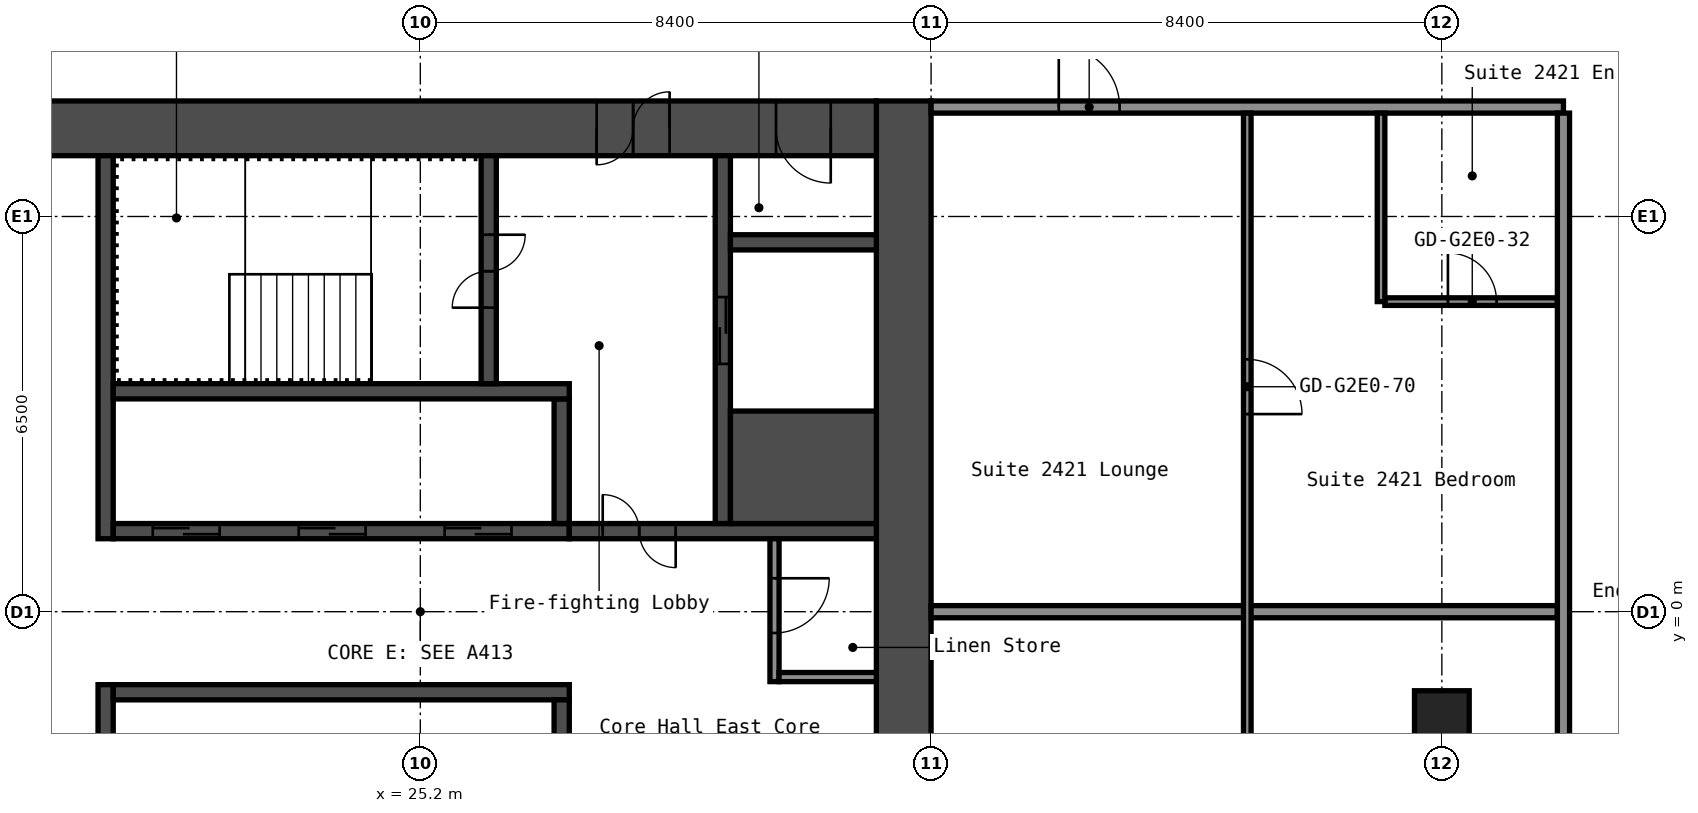
"""IFC4 building model, lengths in metres.
Left out: names, types, materials, properties, quantities, classifications, styles, units other than length and angle.
Written with IfcOpenShell. Run it as: python <this file> out.ifc"""

import sys

from ifc_helpers import new_model, si_unit, direction, frame, frame_2d, origin, origin_2d, place, context, subcontext, project, spatial, rectangle, hollow_rectangle, extrude, element, fill, save


model = new_model("IFC4")
c1 = context("Model", 3, precision=1e-05, world=origin(), true_north=direction((0.0, 1.0)))
c2 = subcontext(c1, "Body", "Model", "MODEL_VIEW")
j1 = project(units=[si_unit("LENGTHUNIT", "METRE"), si_unit("PLANEANGLEUNIT", "RADIAN")], contexts=[c1])
p1 = place(None, origin())
s1 = spatial("IfcSite", under=j1, at=p1, CompositionType="ELEMENT")
p2 = place(p1, origin())
s2 = spatial("IfcBuilding", under=s1, at=p2, CompositionType="ELEMENT")
p3 = place(p2, frame((0.0, 0.0, 88.2)))
s3 = spatial("IfcBuildingStorey", under=s2, at=p3, CompositionType="ELEMENT", Elevation=88.2)
p4 = place(p3, frame((42.0, -1.75, 0.0), z_axis=(0.0, 0.0, 1.0), x_axis=(1.0, 0.0, 0.0)))
e1 = element("IfcColumn", 1, at=p4, inside=s3, PredefinedType="COLUMN", context=c2, shape_type="SweptSolid", body=[
    extrude(hollow_rectangle(XDim=0.9, YDim=0.9, WallThickness=0.036, at=origin_2d()), origin(), (0.0, 0.0, 1.0), 2.8),
])
p5 = place(p3, frame((33.15, -8.4, 0.0), z_axis=(0.0, 0.0, 1.0), x_axis=(0.0, 1.0, 0.0)))
e2 = element("IfcWall", 2, at=p5, inside=s3, PredefinedType="SHEAR", context=c2, shape_type="SweptSolid", body=[
    extrude(rectangle(XDim=16.8, YDim=0.9, at=frame_2d((8.4, 0.0))), origin(), (0.0, 0.0, 1.0), 2.8),
])
p6 = place(p3, frame((17.7, 7.95, 0.0), z_axis=(0.0, 0.0, 1.0), x_axis=(1.0, 0.0, 0.0)))
e3 = element("IfcWall", 3, at=p6, inside=s3, PredefinedType="SHEAR", context=c2, shape_type="SweptSolid", body=[
    extrude(rectangle(XDim=15.0, YDim=0.9, at=frame_2d((7.5, 0.0))), origin(), (0.0, 0.0, 1.0), 2.8),
])
p7 = place(p6, frame((10.4, 0.0, 0.0)))
e4 = element("IfcOpeningElement", 4, at=p7, cuts=e3, PredefinedType="OPENING", context=c2, shape_type="SweptSolid", body=[
    extrude(rectangle(XDim=1.2, YDim=2.1, at=frame_2d((0.6, 1.05))), frame((0.0, 0.46, 0.0), z_axis=(0.0, -1.0, 0.0), x_axis=(1.0, 0.0, 0.0)), (0.0, 0.0, 1.0), 0.92),
])
p8 = place(p6, frame((13.35, 0.0, 0.0)))
e5 = element("IfcOpeningElement", 5, at=p8, cuts=e3, PredefinedType="OPENING", context=c2, shape_type="SweptSolid", body=[
    extrude(rectangle(XDim=0.9, YDim=2.1, at=frame_2d((0.45, 1.05))), frame((0.0, 0.46, 0.0), z_axis=(0.0, -1.0, 0.0), x_axis=(1.0, 0.0, 0.0)), (0.0, 0.0, 1.0), 0.92),
])
p9 = place(p3, frame((20.025, 1.2, 0.0), z_axis=(0.0, 0.0, 1.0), x_axis=(0.0, 1.0, 0.0)))
e6 = element("IfcWall", 6, at=p9, inside=s3, PredefinedType="SHEAR", context=c2, shape_type="SweptSolid", body=[
    extrude(rectangle(XDim=6.3, YDim=0.25, at=frame_2d((3.15, 0.0))), origin(), (0.0, 0.0, 1.0), 2.8),
])
p10 = place(p3, frame((20.025, -7.5, 0.0), z_axis=(0.0, 0.0, 1.0), x_axis=(0.0, 1.0, 0.0)))
e7 = element("IfcWall", 7, at=p10, inside=s3, PredefinedType="SHEAR", context=c2, shape_type="SweptSolid", body=[
    extrude(rectangle(XDim=6.3, YDim=0.25, at=frame_2d((3.15, 0.0))), origin(), (0.0, 0.0, 1.0), 2.8),
])
p11 = place(p10, frame((2.4, 0.0, 0.0)))
e8 = element("IfcOpeningElement", 8, at=p11, cuts=e7, PredefinedType="OPENING", context=c2, shape_type="SweptSolid", body=[
    extrude(rectangle(XDim=1.0, YDim=2.1, at=frame_2d((0.5, 1.05))), frame((0.0, 0.135, 0.0), z_axis=(0.0, -1.0, 0.0), x_axis=(1.0, 0.0, 0.0)), (0.0, 0.0, 1.0), 0.27),
])
p12 = place(p3, frame((20.15, 1.325, 0.0), z_axis=(0.0, 0.0, 1.0), x_axis=(1.0, 0.0, 0.0)))
e9 = element("IfcWall", 9, at=p12, inside=s3, PredefinedType="SHEAR", context=c2, shape_type="SweptSolid", body=[
    extrude(rectangle(XDim=7.5, YDim=0.25, at=frame_2d((3.75, 0.0))), origin(), (0.0, 0.0, 1.0), 2.8),
])
p13 = place(p12, frame((0.65, 0.0, 0.0)))
e10 = element("IfcOpeningElement", 10, at=p13, cuts=e9, PredefinedType="OPENING", context=c2, shape_type="SweptSolid", body=[
    extrude(rectangle(XDim=1.1, YDim=2.1, at=frame_2d((0.55, 1.05))), frame((0.0, 0.135, 0.0), z_axis=(0.0, -1.0, 0.0), x_axis=(1.0, 0.0, 0.0)), (0.0, 0.0, 1.0), 0.27),
])
p14 = place(p12, frame((3.05, 0.0, 0.0)))
e11 = element("IfcOpeningElement", 11, at=p14, cuts=e9, PredefinedType="OPENING", context=c2, shape_type="SweptSolid", body=[
    extrude(rectangle(XDim=1.1, YDim=2.1, at=frame_2d((0.55, 1.05))), frame((0.0, 0.135, 0.0), z_axis=(0.0, -1.0, 0.0), x_axis=(1.0, 0.0, 0.0)), (0.0, 0.0, 1.0), 0.27),
])
p15 = place(p12, frame((5.45, 0.0, 0.0)))
e12 = element("IfcOpeningElement", 12, at=p15, cuts=e9, PredefinedType="OPENING", context=c2, shape_type="SweptSolid", body=[
    extrude(rectangle(XDim=1.1, YDim=2.1, at=frame_2d((0.55, 1.05))), frame((0.0, 0.135, 0.0), z_axis=(0.0, -1.0, 0.0), x_axis=(1.0, 0.0, 0.0)), (0.0, 0.0, 1.0), 0.27),
])
p16 = place(p3, frame((27.525, 1.45, 0.0), z_axis=(0.0, 0.0, 1.0), x_axis=(0.0, 1.0, 0.0)))
e13 = element("IfcWall", 13, at=p16, inside=s3, PredefinedType="SHEAR", context=c2, shape_type="SweptSolid", body=[
    extrude(rectangle(XDim=2.05, YDim=0.25, at=frame_2d((1.025, 0.0))), origin(), (0.0, 0.0, 1.0), 2.8),
])
p17 = place(p3, frame((20.15, 3.625, 0.0), z_axis=(0.0, 0.0, 1.0), x_axis=(1.0, 0.0, 0.0)))
e14 = element("IfcWall", 14, at=p17, inside=s3, PredefinedType="SHEAR", context=c2, shape_type="SweptSolid", body=[
    extrude(rectangle(XDim=7.5, YDim=0.25, at=frame_2d((3.75, 0.0))), origin(), (0.0, 0.0, 1.0), 2.8),
])
p18 = place(p3, frame((26.325, 3.75, 0.0), z_axis=(0.0, 0.0, 1.0), x_axis=(0.0, 1.0, 0.0)))
e15 = element("IfcWall", 15, at=p18, inside=s3, PredefinedType="SHEAR", context=c2, shape_type="SweptSolid", body=[
    extrude(rectangle(XDim=3.75, YDim=0.25, at=frame_2d((1.875, 0.0))), origin(), (0.0, 0.0, 1.0), 2.8),
])
p19 = place(p18, frame((1.25, 0.0, 0.0)))
e16 = element("IfcOpeningElement", 16, at=p19, cuts=e15, PredefinedType="OPENING", context=c2, shape_type="SweptSolid", body=[
    extrude(rectangle(XDim=1.2, YDim=2.1, at=frame_2d((0.6, 1.05))), frame((0.0, 0.135, 0.0), z_axis=(0.0, -1.0, 0.0), x_axis=(1.0, 0.0, 0.0)), (0.0, 0.0, 1.0), 0.27),
])
p20 = place(p3, frame((27.65, 1.325, 0.0), z_axis=(0.0, 0.0, 1.0), x_axis=(1.0, 0.0, 0.0)))
e17 = element("IfcWall", 17, at=p20, inside=s3, PredefinedType="SHEAR", context=c2, shape_type="SweptSolid", body=[
    extrude(rectangle(XDim=5.05, YDim=0.25, at=frame_2d((2.525, 0.0))), origin(), (0.0, 0.0, 1.0), 2.8),
])
p21 = place(p20, frame((0.55, 0.0, 0.0)))
e18 = element("IfcOpeningElement", 18, at=p21, cuts=e17, PredefinedType="OPENING", context=c2, shape_type="SweptSolid", body=[
    extrude(rectangle(XDim=1.2, YDim=2.1, at=frame_2d((0.6, 1.05))), frame((0.0, 0.135, 0.0), z_axis=(0.0, -1.0, 0.0), x_axis=(1.0, 0.0, 0.0)), (0.0, 0.0, 1.0), 0.27),
])
p22 = place(p3, frame((30.175, 1.45, 0.0), z_axis=(0.0, 0.0, 1.0), x_axis=(0.0, 1.0, 0.0)))
e19 = element("IfcWall", 19, at=p22, inside=s3, PredefinedType="SHEAR", context=c2, shape_type="SweptSolid", body=[
    extrude(rectangle(XDim=6.05, YDim=0.25, at=frame_2d((3.025, 0.0))), origin(), (0.0, 0.0, 1.0), 2.8),
])
p23 = place(p22, frame((2.625, 0.0, 0.0)))
e20 = element("IfcOpeningElement", 20, at=p23, cuts=e19, PredefinedType="OPENING", context=c2, shape_type="SweptSolid", body=[
    extrude(rectangle(XDim=1.1, YDim=2.1, at=frame_2d((0.55, 1.05))), frame((0.0, 0.135, 0.0), z_axis=(0.0, -1.0, 0.0), x_axis=(1.0, 0.0, 0.0)), (0.0, 0.0, 1.0), 0.27),
])
p24 = place(p3, frame((30.3, 2.375, 0.0), z_axis=(0.0, 0.0, 1.0), x_axis=(1.0, 0.0, 0.0)))
e21 = element("IfcWall", 21, at=p24, inside=s3, PredefinedType="SHEAR", context=c2, shape_type="SweptSolid", body=[
    extrude(rectangle(XDim=2.4, YDim=1.85, at=frame_2d((1.2, 0.0))), origin(), (0.0, 0.0, 1.0), 2.8),
])
p25 = place(p3, frame((30.3, 6.075, 0.0), z_axis=(0.0, 0.0, 1.0), x_axis=(1.0, 0.0, 0.0)))
e22 = element("IfcWall", 22, at=p25, inside=s3, PredefinedType="SHEAR", context=c2, shape_type="SweptSolid", body=[
    extrude(rectangle(XDim=2.4, YDim=0.25, at=frame_2d((1.2, 0.0))), origin(), (0.0, 0.0, 1.0), 2.8),
])
p26 = place(p3, frame((20.15, -1.325, 0.0), z_axis=(0.0, 0.0, 1.0), x_axis=(1.0, 0.0, 0.0)))
e23 = element("IfcWall", 23, at=p26, inside=s3, PredefinedType="SHEAR", context=c2, shape_type="SweptSolid", body=[
    extrude(rectangle(XDim=7.5, YDim=0.25, at=frame_2d((3.75, 0.0))), origin(), (0.0, 0.0, 1.0), 2.8),
])
p27 = place(p3, frame((27.525, -3.5, 0.0), z_axis=(0.0, 0.0, 1.0), x_axis=(0.0, 1.0, 0.0)))
e24 = element("IfcWall", 24, at=p27, inside=s3, PredefinedType="SHEAR", context=c2, shape_type="SweptSolid", body=[
    extrude(rectangle(XDim=2.05, YDim=0.25, at=frame_2d((1.025, 0.0))), origin(), (0.0, 0.0, 1.0), 2.8),
])
p28 = place(p3, frame((31.025, -1.15, 0.0), z_axis=(0.0, 0.0, 1.0), x_axis=(0.0, 1.0, 0.0)))
e25 = element("IfcWall", 25, at=p28, inside=s3, PredefinedType="PARTITIONING", context=c2, shape_type="SweptSolid", body=[
    extrude(rectangle(XDim=2.35, YDim=0.15, at=frame_2d((1.175, 0.0))), origin(), (0.0, 0.0, 1.0), 2.8),
])
p29 = place(p28, frame((0.8, 0.0, 0.0)))
e26 = element("IfcOpeningElement", 26, at=p29, cuts=e25, PredefinedType="OPENING", context=c2, shape_type="SweptSolid", body=[
    extrude(rectangle(XDim=0.9, YDim=2.1, at=frame_2d((0.45, 1.05))), frame((0.0, 0.085, 0.0), z_axis=(0.0, -1.0, 0.0), x_axis=(1.0, 0.0, 0.0)), (0.0, 0.0, 1.0), 0.17),
])
p30 = place(p3, frame((31.1, -1.075, 0.0), z_axis=(0.0, 0.0, 1.0), x_axis=(1.0, 0.0, 0.0)))
e27 = element("IfcWall", 27, at=p30, inside=s3, PredefinedType="PARTITIONING", context=c2, shape_type="SweptSolid", body=[
    extrude(rectangle(XDim=1.6, YDim=0.15, at=frame_2d((0.8, 0.0))), origin(), (0.0, 0.0, 1.0), 2.8),
])
p31 = place(p3, frame((33.6, 0.0, 0.0), z_axis=(0.0, 0.0, 1.0), x_axis=(1.0, 0.0, 0.0)))
e28 = element("IfcWall", 28, at=p31, inside=s3, PredefinedType="PARTITIONING", context=c2, shape_type="SweptSolid", body=[
    extrude(rectangle(XDim=10.3, YDim=0.2, at=frame_2d((5.15, 0.0))), origin(), (0.0, 0.0, 1.0), 2.8),
])
p32 = place(p3, frame((41.062, 5.1, 0.0), z_axis=(0.0, 0.0, 1.0), x_axis=(1.0, 0.0, 0.0)))
e29 = element("IfcWall", 29, at=p32, inside=s3, PredefinedType="PARTITIONING", context=c2, shape_type="SweptSolid", body=[
    extrude(rectangle(XDim=2.837, YDim=0.125, at=frame_2d((1.419, 0.0))), origin(), (0.0, 0.0, 1.0), 2.8),
])
p33 = place(p32, frame((1.038, 0.0, 0.0)))
e30 = element("IfcOpeningElement", 30, at=p33, cuts=e29, PredefinedType="OPENING", context=c2, shape_type="SweptSolid", body=[
    extrude(rectangle(XDim=0.8, YDim=2.1, at=frame_2d((0.4, 1.05))), frame((0.0, 0.073, 0.0), z_axis=(0.0, -1.0, 0.0), x_axis=(1.0, 0.0, 0.0)), (0.0, 0.0, 1.0), 0.145),
])
p34 = place(p3, frame((33.6, 8.3, 0.0), z_axis=(0.0, 0.0, 1.0), x_axis=(1.0, 0.0, 0.0)))
e31 = element("IfcWall", 31, at=p34, inside=s3, PredefinedType="PARTITIONING", context=c2, shape_type="SweptSolid", body=[
    extrude(rectangle(XDim=10.4, YDim=0.2, at=frame_2d((5.2, 0.0))), origin(), (0.0, 0.0, 1.0), 2.8),
])
p35 = place(p34, frame((2.1, 0.0, 0.0)))
e32 = element("IfcOpeningElement", 32, at=p35, cuts=e31, PredefinedType="OPENING", context=c2, shape_type="SweptSolid", body=[
    extrude(rectangle(XDim=1.0, YDim=2.1, at=frame_2d((0.5, 1.05))), frame((0.0, 0.11, 0.0), z_axis=(0.0, -1.0, 0.0), x_axis=(1.0, 0.0, 0.0)), (0.0, 0.0, 1.0), 0.22),
])
p36 = place(p3, frame((38.8, -8.2, 0.0), z_axis=(0.0, 0.0, 1.0), x_axis=(0.0, 1.0, 0.0)))
e33 = element("IfcWall", 33, at=p36, inside=s3, PredefinedType="PARTITIONING", context=c2, shape_type="SweptSolid", body=[
    extrude(rectangle(XDim=16.4, YDim=0.125, at=frame_2d((8.2, 0.0))), origin(), (0.0, 0.0, 1.0), 2.8),
])
p37 = place(p36, frame((4.05, 0.0, 0.0)))
e34 = element("IfcOpeningElement", 34, at=p37, cuts=e33, PredefinedType="OPENING", context=c2, shape_type="SweptSolid", body=[
    extrude(rectangle(XDim=0.9, YDim=2.1, at=frame_2d((0.45, 1.05))), frame((0.0, 0.073, 0.0), z_axis=(0.0, -1.0, 0.0), x_axis=(1.0, 0.0, 0.0)), (0.0, 0.0, 1.0), 0.145),
])
p38 = place(p36, frame((11.45, 0.0, 0.0)))
e35 = element("IfcOpeningElement", 35, at=p38, cuts=e33, PredefinedType="OPENING", context=c2, shape_type="SweptSolid", body=[
    extrude(rectangle(XDim=0.9, YDim=2.1, at=frame_2d((0.45, 1.05))), frame((0.0, 0.073, 0.0), z_axis=(0.0, -1.0, 0.0), x_axis=(1.0, 0.0, 0.0)), (0.0, 0.0, 1.0), 0.145),
])
p39 = place(p3, frame((41.0, 5.1, 0.0), z_axis=(0.0, 0.0, 1.0), x_axis=(0.0, 1.0, 0.0)))
e36 = element("IfcWall", 36, at=p39, inside=s3, PredefinedType="PARTITIONING", context=c2, shape_type="SweptSolid", body=[
    extrude(rectangle(XDim=3.1, YDim=0.125, at=frame_2d((1.55, 0.0))), origin(), (0.0, 0.0, 1.0), 2.8),
])
p40 = place(p3, frame((44.0, -8.2, 0.0), z_axis=(0.0, 0.0, 1.0), x_axis=(0.0, 1.0, 0.0)))
e37 = element("IfcWall", 37, at=p40, inside=s3, PredefinedType="PARTITIONING", context=c2, shape_type="SweptSolid", body=[
    extrude(rectangle(XDim=16.4, YDim=0.2, at=frame_2d((8.2, 0.0))), origin(), (0.0, 0.0, 1.0), 2.8),
])
p41 = place(p7, origin())
e38 = element("IfcDoor", 38, at=p41, inside=s3, OperationType="DOUBLE_DOOR_SINGLE_SWING", PredefinedType="DOOR", context=c2, shape_type="SweptSolid", body=[
    extrude(rectangle(XDim=1.2, YDim=2.1, at=frame_2d((0.6, 1.05))), frame((0.0, 0.025, 0.0), z_axis=(0.0, -1.0, 0.0), x_axis=(1.0, 0.0, 0.0)), (0.0, 0.0, 1.0), 0.05),
])
fill(e4, e38)
p42 = place(p8, origin())
e39 = element("IfcDoor", 39, at=p42, inside=s3, OperationType="SINGLE_SWING_RIGHT", PredefinedType="DOOR", context=c2, shape_type="SweptSolid", body=[
    extrude(rectangle(XDim=0.9, YDim=2.1, at=frame_2d((0.45, 1.05))), frame((0.0, 0.025, 0.0), z_axis=(0.0, -1.0, 0.0), x_axis=(1.0, 0.0, 0.0)), (0.0, 0.0, 1.0), 0.05),
])
fill(e5, e39)
p43 = place(p19, origin())
e40 = element("IfcDoor", 40, at=p43, inside=s3, OperationType="DOUBLE_DOOR_SINGLE_SWING", PredefinedType="DOOR", context=c2, shape_type="SweptSolid", body=[
    extrude(rectangle(XDim=1.2, YDim=2.1, at=frame_2d((0.6, 1.05))), frame((0.0, 0.025, 0.0), z_axis=(0.0, -1.0, 0.0), x_axis=(1.0, 0.0, 0.0)), (0.0, 0.0, 1.0), 0.05),
])
fill(e16, e40)
p44 = place(p21, origin())
e41 = element("IfcDoor", 41, at=p44, inside=s3, OperationType="DOUBLE_DOOR_SINGLE_SWING", PredefinedType="DOOR", context=c2, shape_type="SweptSolid", body=[
    extrude(rectangle(XDim=1.2, YDim=2.1, at=frame_2d((0.6, 1.05))), frame((0.0, 0.025, 0.0), z_axis=(0.0, -1.0, 0.0), x_axis=(1.0, 0.0, 0.0)), (0.0, 0.0, 1.0), 0.05),
])
fill(e18, e41)
p45 = place(p29, origin())
e42 = element("IfcDoor", 42, at=p45, inside=s3, OperationType="SINGLE_SWING_RIGHT", PredefinedType="DOOR", context=c2, shape_type="SweptSolid", body=[
    extrude(rectangle(XDim=0.9, YDim=2.1, at=frame_2d((0.45, 1.05))), frame((0.0, 0.025, 0.0), z_axis=(0.0, -1.0, 0.0), x_axis=(1.0, 0.0, 0.0)), (0.0, 0.0, 1.0), 0.05),
])
fill(e26, e42)
p46 = place(p13, origin())
e43 = element("IfcDoor", 43, at=p46, inside=s3, OperationType="DOUBLE_DOOR_SLIDING", PredefinedType="DOOR", context=c2, shape_type="SweptSolid", body=[
    extrude(rectangle(XDim=1.1, YDim=2.1, at=frame_2d((0.55, 1.05))), frame((0.0, 0.025, 0.0), z_axis=(0.0, -1.0, 0.0), x_axis=(1.0, 0.0, 0.0)), (0.0, 0.0, 1.0), 0.05),
])
fill(e10, e43)
p47 = place(p14, origin())
e44 = element("IfcDoor", 44, at=p47, inside=s3, OperationType="DOUBLE_DOOR_SLIDING", PredefinedType="DOOR", context=c2, shape_type="SweptSolid", body=[
    extrude(rectangle(XDim=1.1, YDim=2.1, at=frame_2d((0.55, 1.05))), frame((0.0, 0.025, 0.0), z_axis=(0.0, -1.0, 0.0), x_axis=(1.0, 0.0, 0.0)), (0.0, 0.0, 1.0), 0.05),
])
fill(e11, e44)
p48 = place(p15, origin())
e45 = element("IfcDoor", 45, at=p48, inside=s3, OperationType="DOUBLE_DOOR_SLIDING", PredefinedType="DOOR", context=c2, shape_type="SweptSolid", body=[
    extrude(rectangle(XDim=1.1, YDim=2.1, at=frame_2d((0.55, 1.05))), frame((0.0, 0.025, 0.0), z_axis=(0.0, -1.0, 0.0), x_axis=(1.0, 0.0, 0.0)), (0.0, 0.0, 1.0), 0.05),
])
fill(e12, e45)
p49 = place(p23, origin())
e46 = element("IfcDoor", 46, at=p49, inside=s3, OperationType="DOUBLE_DOOR_SLIDING", PredefinedType="DOOR", context=c2, shape_type="SweptSolid", body=[
    extrude(rectangle(XDim=1.1, YDim=2.1, at=frame_2d((0.55, 1.05))), frame((0.0, 0.025, 0.0), z_axis=(0.0, -1.0, 0.0), x_axis=(1.0, 0.0, 0.0)), (0.0, 0.0, 1.0), 0.05),
])
fill(e20, e46)
p50 = place(p33, origin())
e47 = element("IfcDoor", 47, at=p50, inside=s3, OperationType="SINGLE_SWING_RIGHT", PredefinedType="DOOR", context=c2, shape_type="SweptSolid", body=[
    extrude(rectangle(XDim=0.8, YDim=2.1, at=frame_2d((0.4, 1.05))), frame((0.0, 0.025, 0.0), z_axis=(0.0, -1.0, 0.0), x_axis=(1.0, 0.0, 0.0)), (0.0, 0.0, 1.0), 0.05),
])
fill(e30, e47)
p51 = place(p35, origin())
e48 = element("IfcDoor", 48, at=p51, inside=s3, OperationType="SINGLE_SWING_RIGHT", PredefinedType="DOOR", context=c2, shape_type="SweptSolid", body=[
    extrude(rectangle(XDim=1.0, YDim=2.1, at=frame_2d((0.5, 1.05))), frame((0.0, 0.025, 0.0), z_axis=(0.0, -1.0, 0.0), x_axis=(1.0, 0.0, 0.0)), (0.0, 0.0, 1.0), 0.05),
])
fill(e32, e48)
p52 = place(p38, origin())
e49 = element("IfcDoor", 49, at=p52, inside=s3, OperationType="SINGLE_SWING_LEFT", PredefinedType="DOOR", context=c2, shape_type="SweptSolid", body=[
    extrude(rectangle(XDim=0.9, YDim=2.1, at=frame_2d((0.45, 1.05))), frame((0.0, 0.025, 0.0), z_axis=(0.0, -1.0, 0.0), x_axis=(1.0, 0.0, 0.0)), (0.0, 0.0, 1.0), 0.05),
])
fill(e35, e49)
save(model, sys.argv[1])
